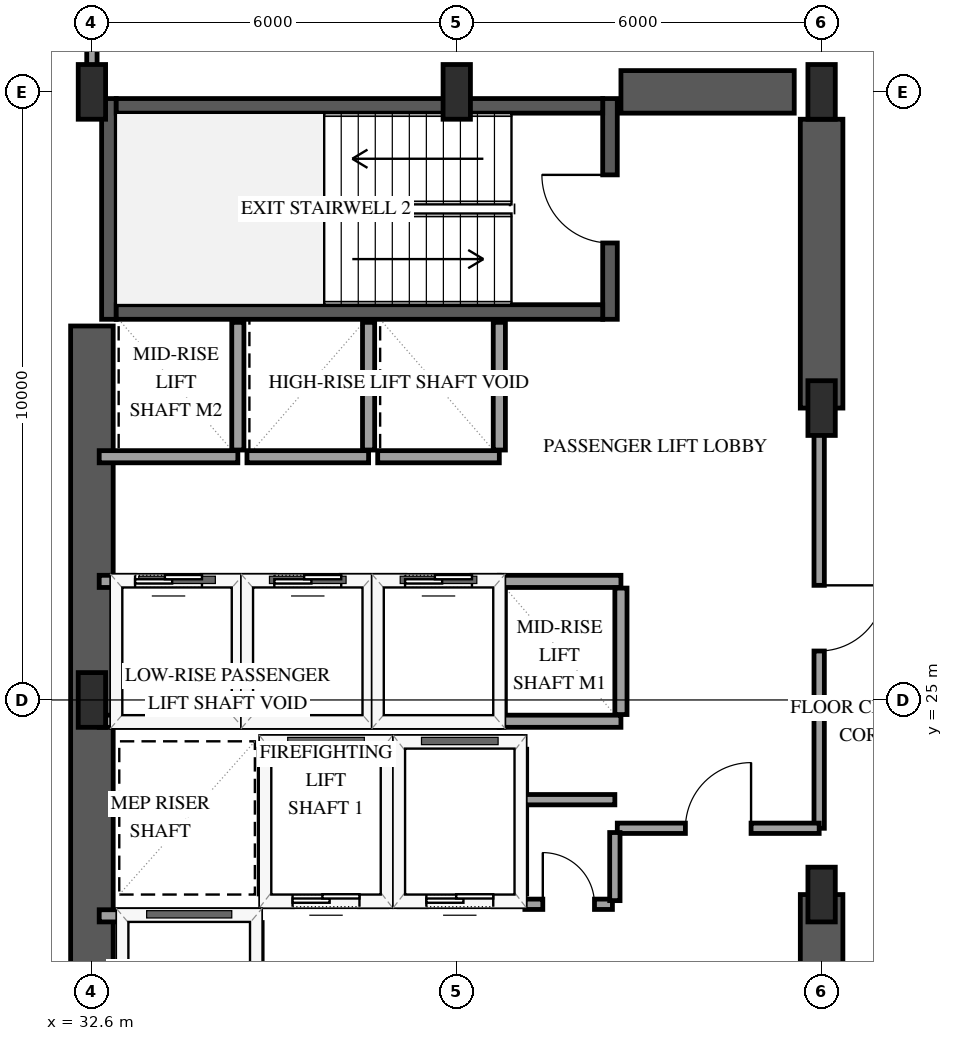
"""IFC4 building model, lengths in metres.
Left out: names, types, materials, properties, quantities, classifications, styles, units other than length and angle.
Written with IfcOpenShell. Run it as: python <this file> out.ifc"""

import sys

from ifc_helpers import new_model, si_unit, direction, frame, frame_2d, origin, origin_2d, place, context, subcontext, project, spatial, rectangle, extrude, element, fill, save


model = new_model("IFC4")
c1 = context("Model", 3, precision=1e-05, world=origin(), true_north=direction((0.0, 1.0)))
c2 = subcontext(c1, "Body", "Model", "MODEL_VIEW")
j1 = project(units=[si_unit("LENGTHUNIT", "METRE"), si_unit("PLANEANGLEUNIT", "RADIAN")], contexts=[c1])
p1 = place(None, origin())
s1 = spatial("IfcSite", under=j1, at=p1, CompositionType="ELEMENT")
p2 = place(p1, origin())
s2 = spatial("IfcBuilding", under=s1, at=p2, CompositionType="ELEMENT")
p3 = place(p2, frame((0.0, 0.0, 74.6)))
s3 = spatial("IfcBuildingStorey", under=s2, at=p3, CompositionType="ELEMENT", Elevation=74.6)
p4 = place(p3, frame((32.88, 31.26, 0.0), z_axis=(0.0, 0.0, 1.0), x_axis=(0.0, 1.0, 0.0)))
e1 = element("IfcWall", 1, at=p4, inside=s3, PredefinedType="SHEAR", context=c2, shape_type="SweptSolid", body=[
    extrude(rectangle(XDim=3.63, YDim=0.24, at=frame_2d((1.815, 0.0))), origin(), (0.0, 0.0, 1.0), 4.0),
])
p5 = place(p3, frame((41.12, 31.26, 0.0), z_axis=(0.0, 0.0, 1.0), x_axis=(0.0, 1.0, 0.0)))
e2 = element("IfcWall", 2, at=p5, inside=s3, PredefinedType="SHEAR", context=c2, shape_type="SweptSolid", body=[
    extrude(rectangle(XDim=3.63, YDim=0.24, at=frame_2d((1.815, 0.0))), origin(), (0.0, 0.0, 1.0), 4.0),
])
p6 = place(p5, frame((1.255, 0.0, 0.0)))
e3 = element("IfcOpeningElement", 3, at=p6, cuts=e2, PredefinedType="OPENING", context=c2, shape_type="SweptSolid", body=[
    extrude(rectangle(XDim=1.12, YDim=2.15, at=frame_2d((0.56, 1.075))), frame((0.0, 0.13, 0.0), z_axis=(0.0, -1.0, 0.0), x_axis=(1.0, 0.0, 0.0)), (0.0, 0.0, 1.0), 0.26),
])
for number, where, z_axis, x_axis in (
    (4, (33.0, 31.38, 0.0), (0.0, 0.0, 1.0), (1.0, 0.0, 0.0)),
    (5, (33.0, 34.77, 0.0), (0.0, 0.0, 1.0), (1.0, 0.0, 0.0)),
):
    element("IfcWall", number, at=place(p3, frame(where, z_axis=z_axis, x_axis=x_axis)), inside=s3, PredefinedType="SHEAR", context=c2, shape_type="SweptSolid", body=[
        extrude(rectangle(XDim=8.0, YDim=0.24, at=frame_2d((4.0, 0.0))), origin(), (0.0, 0.0, 1.0), 4.0),
    ])
p7 = place(p3, frame((32.6, 18.85, 0.0), z_axis=(0.0, 0.0, 1.0), x_axis=(0.0, 1.0, 0.0)))
e6 = element("IfcWall", 6, at=p7, inside=s3, PredefinedType="SHEAR", context=c2, shape_type="SweptSolid", body=[
    extrude(rectangle(XDim=12.3, YDim=0.7, at=frame_2d((6.15, 0.0))), origin(), (0.0, 0.0, 1.0), 4.0),
])
p8 = place(p3, frame((41.3, 35.0, 0.0), z_axis=(0.0, 0.0, 1.0), x_axis=(1.0, 0.0, 0.0)))
e7 = element("IfcWall", 7, at=p8, inside=s3, PredefinedType="SHEAR", context=c2, shape_type="SweptSolid", body=[
    extrude(rectangle(XDim=2.85, YDim=0.7, at=frame_2d((1.425, 0.0))), origin(), (0.0, 0.0, 1.0), 4.0),
])
p9 = place(p3, frame((44.6, 15.45, 0.0), z_axis=(0.0, 0.0, 1.0), x_axis=(0.0, 1.0, 0.0)))
e8 = element("IfcWall", 8, at=p9, inside=s3, PredefinedType="SHEAR", context=c2, shape_type="SweptSolid", body=[
    extrude(rectangle(XDim=6.35, YDim=0.7, at=frame_2d((3.175, 0.0))), origin(), (0.0, 0.0, 1.0), 4.0),
])
p10 = place(p3, frame((44.6, 29.8, 0.0), z_axis=(0.0, 0.0, 1.0), x_axis=(0.0, 1.0, 0.0)))
e9 = element("IfcWall", 9, at=p10, inside=s3, PredefinedType="SHEAR", context=c2, shape_type="SweptSolid", body=[
    extrude(rectangle(XDim=4.75, YDim=0.7, at=frame_2d((2.375, 0.0))), origin(), (0.0, 0.0, 1.0), 4.0),
])
for number, where, z_axis, x_axis in (
    (10, (32.6, 25.0, 0.0), (0.0, 0.0, 1.0), (1.0, 0.0, 0.0)),
    (11, (32.6, 35.0, 0.0), (0.0, 0.0, 1.0), (1.0, 0.0, 0.0)),
    (12, (38.6, 35.0, 0.0), (0.0, 0.0, 1.0), (1.0, 0.0, 0.0)),
    (13, (44.6, 21.8, 0.0), (0.0, 0.0, 1.0), (1.0, 0.0, 0.0)),
    (14, (44.6, 29.8, 0.0), (0.0, 0.0, 1.0), (1.0, 0.0, 0.0)),
    (15, (44.6, 35.0, 0.0), (0.0, 0.0, 1.0), (1.0, 0.0, 0.0)),
):
    element("IfcColumn", number, at=place(p3, frame(where, z_axis=z_axis, x_axis=x_axis)), inside=s3, PredefinedType="PILASTER", context=c2, shape_type="SweptSolid", body=[
        extrude(rectangle(XDim=0.45, YDim=0.9, at=origin_2d()), origin(), (0.0, 0.0, 1.0), 4.0),
    ])
p11 = place(p3, frame((35.45, 21.7, 0.0), z_axis=(0.0, 0.0, 1.0), x_axis=(1.0, 0.0, 0.0)))
e16 = element("IfcWall", 16, at=p11, inside=s3, PredefinedType="SOLIDWALL", context=c2, shape_type="SweptSolid", body=[
    extrude(rectangle(XDim=2.0, YDim=0.2, at=frame_2d((1.0, 0.0))), origin(), (0.0, 0.0, 1.0), 3.7),
])
p12 = place(p11, frame((0.45, 0.0, 0.0)))
e17 = element("IfcOpeningElement", 17, at=p12, cuts=e16, PredefinedType="OPENING", context=c2, shape_type="SweptSolid", body=[
    extrude(rectangle(XDim=1.1, YDim=2.15, at=frame_2d((0.55, 1.075))), frame((0.0, 0.11, 0.0), z_axis=(0.0, -1.0, 0.0), x_axis=(1.0, 0.0, 0.0)), (0.0, 0.0, 1.0), 0.22),
])
p13 = place(p3, frame((35.45, 24.3, 0.0), z_axis=(0.0, 0.0, 1.0), x_axis=(1.0, 0.0, 0.0)))
e18 = element("IfcWall", 18, at=p13, inside=s3, PredefinedType="SOLIDWALL", context=c2, shape_type="SweptSolid", body=[
    extrude(rectangle(XDim=2.0, YDim=0.2, at=frame_2d((1.0, 0.0))), origin(), (0.0, 0.0, 1.0), 3.7),
])
for number, where, z_axis, x_axis in (
    (19, (35.45, 21.81, 0.0), (0.0, 0.0, 1.0), (0.0, 1.0, 0.0)),
    (20, (37.45, 21.81, 0.0), (0.0, 0.0, 1.0), (0.0, 1.0, 0.0)),
):
    element("IfcWall", number, at=place(p3, frame(where, z_axis=z_axis, x_axis=x_axis)), inside=s3, PredefinedType="SOLIDWALL", context=c2, shape_type="SweptSolid", body=[
        extrude(rectangle(XDim=2.38, YDim=0.2, at=frame_2d((1.19, 0.0))), origin(), (0.0, 0.0, 1.0), 3.7),
    ])
p14 = place(p3, frame((37.65, 21.7, 0.0), z_axis=(0.0, 0.0, 1.0), x_axis=(1.0, 0.0, 0.0)))
e21 = element("IfcWall", 21, at=p14, inside=s3, PredefinedType="SOLIDWALL", context=c2, shape_type="SweptSolid", body=[
    extrude(rectangle(XDim=2.0, YDim=0.2, at=frame_2d((1.0, 0.0))), origin(), (0.0, 0.0, 1.0), 3.7),
])
p15 = place(p14, frame((0.45, 0.0, 0.0)))
e22 = element("IfcOpeningElement", 22, at=p15, cuts=e21, PredefinedType="OPENING", context=c2, shape_type="SweptSolid", body=[
    extrude(rectangle(XDim=1.1, YDim=2.15, at=frame_2d((0.55, 1.075))), frame((0.0, 0.11, 0.0), z_axis=(0.0, -1.0, 0.0), x_axis=(1.0, 0.0, 0.0)), (0.0, 0.0, 1.0), 0.22),
])
p16 = place(p3, frame((37.65, 24.3, 0.0), z_axis=(0.0, 0.0, 1.0), x_axis=(1.0, 0.0, 0.0)))
e23 = element("IfcWall", 23, at=p16, inside=s3, PredefinedType="SOLIDWALL", context=c2, shape_type="SweptSolid", body=[
    extrude(rectangle(XDim=2.0, YDim=0.2, at=frame_2d((1.0, 0.0))), origin(), (0.0, 0.0, 1.0), 3.7),
])
p17 = place(p3, frame((39.65, 21.81, 0.0), z_axis=(0.0, 0.0, 1.0), x_axis=(0.0, 1.0, 0.0)))
e24 = element("IfcWall", 24, at=p17, inside=s3, PredefinedType="SOLIDWALL", context=c2, shape_type="SweptSolid", body=[
    extrude(rectangle(XDim=2.38, YDim=0.2, at=frame_2d((1.19, 0.0))), origin(), (0.0, 0.0, 1.0), 3.7),
])
p18 = place(p3, frame((32.72, 21.45, 0.0), z_axis=(0.0, 0.0, 1.0), x_axis=(1.0, 0.0, 0.0)))
e25 = element("IfcWall", 25, at=p18, inside=s3, PredefinedType="SOLIDWALL", context=c2, shape_type="SweptSolid", body=[
    extrude(rectangle(XDim=2.58, YDim=0.2, at=frame_2d((1.29, 0.0))), origin(), (0.0, 0.0, 1.0), 3.7),
])
p19 = place(p3, frame((35.3, 18.79, 0.0), z_axis=(0.0, 0.0, 1.0), x_axis=(0.0, 1.0, 0.0)))
e26 = element("IfcWall", 26, at=p19, inside=s3, PredefinedType="SOLIDWALL", context=c2, shape_type="SweptSolid", body=[
    extrude(rectangle(XDim=2.55, YDim=0.2, at=frame_2d((1.275, 0.0))), origin(), (0.0, 0.0, 1.0), 3.7),
])
p20 = place(p19, frame((0.725, 0.0, 0.0)))
e27 = element("IfcOpeningElement", 27, at=p20, cuts=e26, PredefinedType="OPENING", context=c2, shape_type="SweptSolid", body=[
    extrude(rectangle(XDim=1.1, YDim=2.15, at=frame_2d((0.55, 1.075))), frame((0.0, 0.11, 0.0), z_axis=(0.0, -1.0, 0.0), x_axis=(1.0, 0.0, 0.0)), (0.0, 0.0, 1.0), 0.22),
])
p21 = place(p3, frame((32.72, 24.65, 0.0), z_axis=(0.0, 0.0, 1.0), x_axis=(1.0, 0.0, 0.0)))
e28 = element("IfcWall", 28, at=p21, inside=s3, PredefinedType="SOLIDWALL", context=c2, shape_type="SweptSolid", body=[
    extrude(rectangle(XDim=2.28, YDim=0.2, at=frame_2d((1.14, 0.0))), origin(), (0.0, 0.0, 1.0), 3.7),
])
p22 = place(p3, frame((32.72, 26.95, 0.0), z_axis=(0.0, 0.0, 1.0), x_axis=(1.0, 0.0, 0.0)))
e29 = element("IfcWall", 29, at=p22, inside=s3, PredefinedType="SOLIDWALL", context=c2, shape_type="SweptSolid", body=[
    extrude(rectangle(XDim=2.28, YDim=0.2, at=frame_2d((1.14, 0.0))), origin(), (0.0, 0.0, 1.0), 3.7),
])
p23 = place(p22, frame((0.59, 0.0, 0.0)))
e30 = element("IfcOpeningElement", 30, at=p23, cuts=e29, PredefinedType="OPENING", context=c2, shape_type="SweptSolid", body=[
    extrude(rectangle(XDim=1.1, YDim=2.15, at=frame_2d((0.55, 1.075))), frame((0.0, 0.11, 0.0), z_axis=(0.0, -1.0, 0.0), x_axis=(1.0, 0.0, 0.0)), (0.0, 0.0, 1.0), 0.22),
])
p24 = place(p3, frame((35.0, 24.76, 0.0), z_axis=(0.0, 0.0, 1.0), x_axis=(0.0, 1.0, 0.0)))
e31 = element("IfcWall", 31, at=p24, inside=s3, PredefinedType="SOLIDWALL", context=c2, shape_type="SweptSolid", body=[
    extrude(rectangle(XDim=2.08, YDim=0.2, at=frame_2d((1.04, 0.0))), origin(), (0.0, 0.0, 1.0), 3.7),
])
p25 = place(p3, frame((35.15, 24.65, 0.0), z_axis=(0.0, 0.0, 1.0), x_axis=(1.0, 0.0, 0.0)))
e32 = element("IfcWall", 32, at=p25, inside=s3, PredefinedType="SOLIDWALL", context=c2, shape_type="SweptSolid", body=[
    extrude(rectangle(XDim=2.0, YDim=0.2, at=frame_2d((1.0, 0.0))), origin(), (0.0, 0.0, 1.0), 3.7),
])
p26 = place(p3, frame((35.15, 26.95, 0.0), z_axis=(0.0, 0.0, 1.0), x_axis=(1.0, 0.0, 0.0)))
e33 = element("IfcWall", 33, at=p26, inside=s3, PredefinedType="SOLIDWALL", context=c2, shape_type="SweptSolid", body=[
    extrude(rectangle(XDim=2.0, YDim=0.2, at=frame_2d((1.0, 0.0))), origin(), (0.0, 0.0, 1.0), 3.7),
])
p27 = place(p26, frame((0.45, 0.0, 0.0)))
e34 = element("IfcOpeningElement", 34, at=p27, cuts=e33, PredefinedType="OPENING", context=c2, shape_type="SweptSolid", body=[
    extrude(rectangle(XDim=1.1, YDim=2.15, at=frame_2d((0.55, 1.075))), frame((0.0, 0.11, 0.0), z_axis=(0.0, -1.0, 0.0), x_axis=(1.0, 0.0, 0.0)), (0.0, 0.0, 1.0), 0.22),
])
p28 = place(p3, frame((37.15, 24.76, 0.0), z_axis=(0.0, 0.0, 1.0), x_axis=(0.0, 1.0, 0.0)))
e35 = element("IfcWall", 35, at=p28, inside=s3, PredefinedType="SOLIDWALL", context=c2, shape_type="SweptSolid", body=[
    extrude(rectangle(XDim=2.08, YDim=0.2, at=frame_2d((1.04, 0.0))), origin(), (0.0, 0.0, 1.0), 3.7),
])
p29 = place(p3, frame((37.3, 24.65, 0.0), z_axis=(0.0, 0.0, 1.0), x_axis=(1.0, 0.0, 0.0)))
e36 = element("IfcWall", 36, at=p29, inside=s3, PredefinedType="SOLIDWALL", context=c2, shape_type="SweptSolid", body=[
    extrude(rectangle(XDim=2.0, YDim=0.2, at=frame_2d((1.0, 0.0))), origin(), (0.0, 0.0, 1.0), 3.7),
])
p30 = place(p3, frame((37.3, 26.95, 0.0), z_axis=(0.0, 0.0, 1.0), x_axis=(1.0, 0.0, 0.0)))
e37 = element("IfcWall", 37, at=p30, inside=s3, PredefinedType="SOLIDWALL", context=c2, shape_type="SweptSolid", body=[
    extrude(rectangle(XDim=2.0, YDim=0.2, at=frame_2d((1.0, 0.0))), origin(), (0.0, 0.0, 1.0), 3.7),
])
p31 = place(p30, frame((0.45, 0.0, 0.0)))
e38 = element("IfcOpeningElement", 38, at=p31, cuts=e37, PredefinedType="OPENING", context=c2, shape_type="SweptSolid", body=[
    extrude(rectangle(XDim=1.1, YDim=2.15, at=frame_2d((0.55, 1.075))), frame((0.0, 0.11, 0.0), z_axis=(0.0, -1.0, 0.0), x_axis=(1.0, 0.0, 0.0)), (0.0, 0.0, 1.0), 0.22),
])
p32 = place(p3, frame((39.3, 24.76, 0.0), z_axis=(0.0, 0.0, 1.0), x_axis=(0.0, 1.0, 0.0)))
e39 = element("IfcWall", 39, at=p32, inside=s3, PredefinedType="SOLIDWALL", context=c2, shape_type="SweptSolid", body=[
    extrude(rectangle(XDim=2.08, YDim=0.2, at=frame_2d((1.04, 0.0))), origin(), (0.0, 0.0, 1.0), 3.7),
])
for number, where, z_axis, x_axis in (
    (40, (39.3, 24.65, 0.0), (0.0, 0.0, 1.0), (1.0, 0.0, 0.0)),
    (41, (39.3, 26.95, 0.0), (0.0, 0.0, 1.0), (1.0, 0.0, 0.0)),
):
    element("IfcWall", number, at=place(p3, frame(where, z_axis=z_axis, x_axis=x_axis)), inside=s3, PredefinedType="SOLIDWALL", context=c2, shape_type="SweptSolid", body=[
        extrude(rectangle(XDim=2.0, YDim=0.2, at=frame_2d((1.0, 0.0))), origin(), (0.0, 0.0, 1.0), 3.7),
    ])
p33 = place(p3, frame((41.3, 24.76, 0.0), z_axis=(0.0, 0.0, 1.0), x_axis=(0.0, 1.0, 0.0)))
e42 = element("IfcWall", 42, at=p33, inside=s3, PredefinedType="SOLIDWALL", context=c2, shape_type="SweptSolid", body=[
    extrude(rectangle(XDim=2.08, YDim=0.2, at=frame_2d((1.04, 0.0))), origin(), (0.0, 0.0, 1.0), 3.7),
])
p34 = place(p3, frame((32.72, 29.0, 0.0), z_axis=(0.0, 0.0, 1.0), x_axis=(1.0, 0.0, 0.0)))
e43 = element("IfcWall", 43, at=p34, inside=s3, PredefinedType="SOLIDWALL", context=c2, shape_type="SweptSolid", body=[
    extrude(rectangle(XDim=2.28, YDim=0.2, at=frame_2d((1.14, 0.0))), origin(), (0.0, 0.0, 1.0), 3.7),
])
p35 = place(p3, frame((35.0, 29.11, 0.0), z_axis=(0.0, 0.0, 1.0), x_axis=(0.0, 1.0, 0.0)))
e44 = element("IfcWall", 44, at=p35, inside=s3, PredefinedType="SOLIDWALL", context=c2, shape_type="SweptSolid", body=[
    extrude(rectangle(XDim=2.1, YDim=0.2, at=frame_2d((1.05, 0.0))), origin(), (0.0, 0.0, 1.0), 3.7),
])
p36 = place(p3, frame((35.15, 29.0, 0.0), z_axis=(0.0, 0.0, 1.0), x_axis=(1.0, 0.0, 0.0)))
e45 = element("IfcWall", 45, at=p36, inside=s3, PredefinedType="SOLIDWALL", context=c2, shape_type="SweptSolid", body=[
    extrude(rectangle(XDim=2.0, YDim=0.2, at=frame_2d((1.0, 0.0))), origin(), (0.0, 0.0, 1.0), 3.7),
])
p37 = place(p3, frame((37.15, 29.11, 0.0), z_axis=(0.0, 0.0, 1.0), x_axis=(0.0, 1.0, 0.0)))
e46 = element("IfcWall", 46, at=p37, inside=s3, PredefinedType="SOLIDWALL", context=c2, shape_type="SweptSolid", body=[
    extrude(rectangle(XDim=2.1, YDim=0.2, at=frame_2d((1.05, 0.0))), origin(), (0.0, 0.0, 1.0), 3.7),
])
p38 = place(p3, frame((37.3, 29.0, 0.0), z_axis=(0.0, 0.0, 1.0), x_axis=(1.0, 0.0, 0.0)))
e47 = element("IfcWall", 47, at=p38, inside=s3, PredefinedType="SOLIDWALL", context=c2, shape_type="SweptSolid", body=[
    extrude(rectangle(XDim=2.0, YDim=0.2, at=frame_2d((1.0, 0.0))), origin(), (0.0, 0.0, 1.0), 3.7),
])
p39 = place(p3, frame((39.3, 29.11, 0.0), z_axis=(0.0, 0.0, 1.0), x_axis=(0.0, 1.0, 0.0)))
e48 = element("IfcWall", 48, at=p39, inside=s3, PredefinedType="SOLIDWALL", context=c2, shape_type="SweptSolid", body=[
    extrude(rectangle(XDim=2.1, YDim=0.2, at=frame_2d((1.05, 0.0))), origin(), (0.0, 0.0, 1.0), 3.7),
])
p40 = place(p3, frame((44.56, 29.8, 0.0), z_axis=(0.0, 0.0, 1.0), x_axis=(0.0, -1.0, 0.0)))
e49 = element("IfcWall", 49, at=p40, inside=s3, PredefinedType="PARTITIONING", context=c2, shape_type="SweptSolid", body=[
    extrude(rectangle(XDim=6.91, YDim=0.17, at=frame_2d((3.455, 0.0))), origin(), (0.0, 0.0, 1.0), 2.74),
])
p41 = place(p40, frame((2.915, 0.0, 0.0)))
e50 = element("IfcOpeningElement", 50, at=p41, cuts=e49, PredefinedType="OPENING", context=c2, shape_type="SweptSolid", body=[
    extrude(rectangle(XDim=1.08, YDim=2.15, at=frame_2d((0.54, 1.075))), frame((0.0, 0.095, 0.0), z_axis=(0.0, -1.0, 0.0), x_axis=(1.0, 0.0, 0.0)), (0.0, 0.0, 1.0), 0.19),
])
p42 = place(p3, frame((41.24, 22.89, 0.0), z_axis=(0.0, 0.0, 1.0), x_axis=(1.0, 0.0, 0.0)))
e51 = element("IfcWall", 51, at=p42, inside=s3, PredefinedType="PARTITIONING", context=c2, shape_type="SweptSolid", body=[
    extrude(rectangle(XDim=3.32, YDim=0.17, at=frame_2d((1.66, 0.0))), origin(), (0.0, 0.0, 1.0), 3.7),
])
p43 = place(p42, frame((1.12, 0.0, 0.0)))
e52 = element("IfcOpeningElement", 52, at=p43, cuts=e51, PredefinedType="OPENING", context=c2, shape_type="SweptSolid", body=[
    extrude(rectangle(XDim=1.08, YDim=2.15, at=frame_2d((0.54, 1.075))), frame((0.0, 0.095, 0.0), z_axis=(0.0, -1.0, 0.0), x_axis=(1.0, 0.0, 0.0)), (0.0, 0.0, 1.0), 0.19),
])
p44 = place(p3, frame((32.6, 35.07, 0.0), z_axis=(0.0, 0.0, 1.0), x_axis=(0.0, 1.0, 0.0)))
e53 = element("IfcWall", 53, at=p44, inside=s3, PredefinedType="PARTITIONING", context=c2, shape_type="SweptSolid", body=[
    extrude(rectangle(XDim=1.91, YDim=0.17, at=frame_2d((0.955, 0.0))), origin(), (0.0, 0.0, 1.0), 3.7),
])
p45 = place(p3, frame((39.72, 21.64, 0.0), z_axis=(0.0, 0.0, 1.0), x_axis=(1.0, 0.0, 0.0)))
e54 = element("IfcWall", 54, at=p45, inside=s3, PredefinedType="PARTITIONING", context=c2, shape_type="SweptSolid", body=[
    extrude(rectangle(XDim=1.44, YDim=0.17, at=frame_2d((0.72, 0.0))), origin(), (0.0, 0.0, 1.0), 3.7),
])
p46 = place(p45, frame((0.295, 0.0, 0.0)))
e55 = element("IfcOpeningElement", 55, at=p46, cuts=e54, PredefinedType="OPENING", context=c2, shape_type="SweptSolid", body=[
    extrude(rectangle(XDim=0.85, YDim=2.1, at=frame_2d((0.425, 1.05))), frame((0.0, 0.095, 0.0), z_axis=(0.0, -1.0, 0.0), x_axis=(1.0, 0.0, 0.0)), (0.0, 0.0, 1.0), 0.19),
])
p47 = place(p3, frame((41.2, 21.7, 0.0), z_axis=(0.0, 0.0, 1.0), x_axis=(0.0, 1.0, 0.0)))
e56 = element("IfcWall", 56, at=p47, inside=s3, PredefinedType="PARTITIONING", context=c2, shape_type="SweptSolid", body=[
    extrude(rectangle(XDim=1.12, YDim=0.17, at=frame_2d((0.56, 0.0))), origin(), (0.0, 0.0, 1.0), 3.7),
])
p48 = place(p3, frame((41.2, 23.36, 0.0), z_axis=(0.0, 0.0, 1.0), x_axis=(-1.0, 0.0, 0.0)))
e57 = element("IfcWall", 57, at=p48, inside=s3, PredefinedType="PARTITIONING", context=c2, shape_type="SweptSolid", body=[
    extrude(rectangle(XDim=1.48, YDim=0.17, at=frame_2d((0.74, 0.0))), origin(), (0.0, 0.0, 1.0), 3.7),
])
p49 = place(p12, origin())
e58 = element("IfcDoor", 58, at=p49, inside=s3, OperationType="SLIDING_TO_LEFT", PredefinedType="DOOR", context=c2, shape_type="SweptSolid", body=[
    extrude(rectangle(XDim=1.1, YDim=2.15, at=frame_2d((0.55, 1.075))), frame((0.0, 0.025, 0.0), z_axis=(0.0, -1.0, 0.0), x_axis=(1.0, 0.0, 0.0)), (0.0, 0.0, 1.0), 0.05),
])
fill(e17, e58)
p50 = place(p15, origin())
e59 = element("IfcDoor", 59, at=p50, inside=s3, OperationType="SLIDING_TO_LEFT", PredefinedType="DOOR", context=c2, shape_type="SweptSolid", body=[
    extrude(rectangle(XDim=1.1, YDim=2.15, at=frame_2d((0.55, 1.075))), frame((0.0, 0.025, 0.0), z_axis=(0.0, -1.0, 0.0), x_axis=(1.0, 0.0, 0.0)), (0.0, 0.0, 1.0), 0.05),
])
fill(e22, e59)
p51 = place(p23, origin())
e60 = element("IfcDoor", 60, at=p51, inside=s3, OperationType="SLIDING_TO_LEFT", PredefinedType="DOOR", context=c2, shape_type="SweptSolid", body=[
    extrude(rectangle(XDim=1.1, YDim=2.15, at=frame_2d((0.55, 1.075))), frame((0.0, 0.025, 0.0), z_axis=(0.0, -1.0, 0.0), x_axis=(1.0, 0.0, 0.0)), (0.0, 0.0, 1.0), 0.05),
])
fill(e30, e60)
p52 = place(p27, origin())
e61 = element("IfcDoor", 61, at=p52, inside=s3, OperationType="SLIDING_TO_LEFT", PredefinedType="DOOR", context=c2, shape_type="SweptSolid", body=[
    extrude(rectangle(XDim=1.1, YDim=2.15, at=frame_2d((0.55, 1.075))), frame((0.0, 0.025, 0.0), z_axis=(0.0, -1.0, 0.0), x_axis=(1.0, 0.0, 0.0)), (0.0, 0.0, 1.0), 0.05),
])
fill(e34, e61)
p53 = place(p31, origin())
e62 = element("IfcDoor", 62, at=p53, inside=s3, OperationType="SLIDING_TO_LEFT", PredefinedType="DOOR", context=c2, shape_type="SweptSolid", body=[
    extrude(rectangle(XDim=1.1, YDim=2.15, at=frame_2d((0.55, 1.075))), frame((0.0, 0.025, 0.0), z_axis=(0.0, -1.0, 0.0), x_axis=(1.0, 0.0, 0.0)), (0.0, 0.0, 1.0), 0.05),
])
fill(e38, e62)
p54 = place(p6, origin())
e63 = element("IfcDoor", 63, at=p54, inside=s3, OperationType="SINGLE_SWING_RIGHT", PredefinedType="DOOR", context=c2, shape_type="SweptSolid", body=[
    extrude(rectangle(XDim=1.12, YDim=2.15, at=frame_2d((0.56, 1.075))), frame((0.0, 0.025, 0.0), z_axis=(0.0, -1.0, 0.0), x_axis=(1.0, 0.0, 0.0)), (0.0, 0.0, 1.0), 0.05),
])
fill(e3, e63)
p55 = place(p41, origin())
e64 = element("IfcDoor", 64, at=p55, inside=s3, OperationType="SINGLE_SWING_LEFT", PredefinedType="DOOR", context=c2, shape_type="SweptSolid", body=[
    extrude(rectangle(XDim=1.08, YDim=2.15, at=frame_2d((0.54, 1.075))), frame((0.0, 0.025, 0.0), z_axis=(0.0, -1.0, 0.0), x_axis=(1.0, 0.0, 0.0)), (0.0, 0.0, 1.0), 0.05),
])
fill(e50, e64)
p56 = place(p43, origin())
e65 = element("IfcDoor", 65, at=p56, inside=s3, OperationType="SINGLE_SWING_RIGHT", PredefinedType="DOOR", context=c2, shape_type="SweptSolid", body=[
    extrude(rectangle(XDim=1.08, YDim=2.15, at=frame_2d((0.54, 1.075))), frame((0.0, 0.025, 0.0), z_axis=(0.0, -1.0, 0.0), x_axis=(1.0, 0.0, 0.0)), (0.0, 0.0, 1.0), 0.05),
])
fill(e52, e65)
p57 = place(p46, origin())
e66 = element("IfcDoor", 66, at=p57, inside=s3, OperationType="SINGLE_SWING_LEFT", PredefinedType="DOOR", context=c2, shape_type="SweptSolid", body=[
    extrude(rectangle(XDim=0.85, YDim=2.1, at=frame_2d((0.425, 1.05))), frame((0.0, 0.025, 0.0), z_axis=(0.0, -1.0, 0.0), x_axis=(1.0, 0.0, 0.0)), (0.0, 0.0, 1.0), 0.05),
])
fill(e55, e66)
save(model, sys.argv[1])
